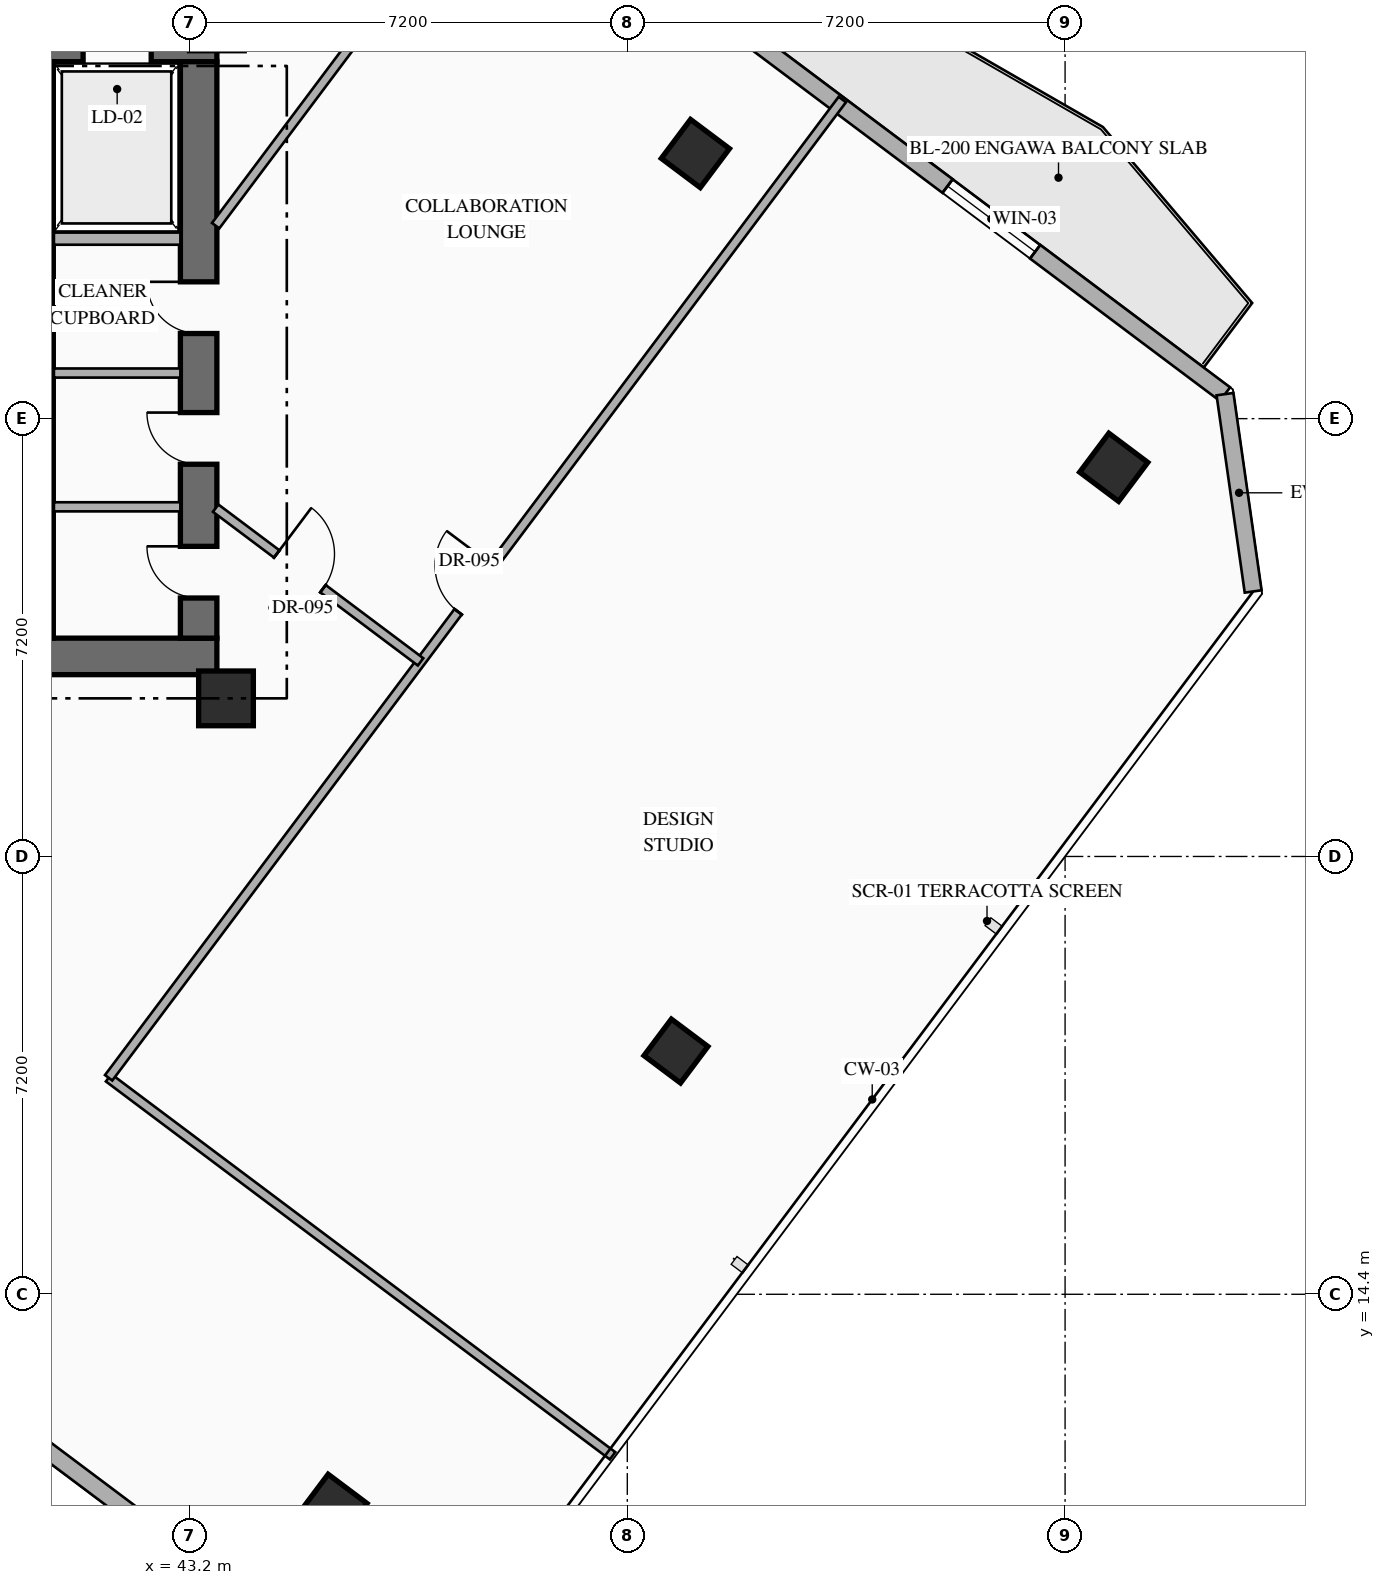
"""IFC4 building model, lengths in metres.
Left out: names, types, materials, properties, quantities, classifications, styles, units other than length and angle.
Written with IfcOpenShell. Run it as: python <this file> out.ifc"""

import sys

from ifc_helpers import new_model, si_unit, direction, frame, frame_2d, origin, origin_2d, place, context, subcontext, project, spatial, rectangle, hollow_rectangle, extrude, element, fill, save


model = new_model("IFC4")
c1 = context("Model", 3, precision=1e-05, world=origin(), true_north=direction((0.0, 1.0)))
c2 = subcontext(c1, "Body", "Model", "MODEL_VIEW")
j1 = project(units=[si_unit("LENGTHUNIT", "METRE"), si_unit("PLANEANGLEUNIT", "RADIAN")], contexts=[c1])
p1 = place(None, origin())
s1 = spatial("IfcSite", under=j1, at=p1, CompositionType="ELEMENT")
p2 = place(p1, origin())
s2 = spatial("IfcBuilding", under=s1, at=p2, CompositionType="ELEMENT")
p3 = place(p2, frame((0.0, 0.0, 170.85)))
s3 = spatial("IfcBuildingStorey", under=s2, at=p3, CompositionType="ELEMENT", Elevation=170.85)
p4 = place(p3, frame((35.89, 24.89, 0.0), z_axis=(0.0, 0.0, 1.0), x_axis=(1.0, 0.0, 0.0)))
e1 = element("IfcWall", 1, at=p4, inside=s3, PredefinedType="SHEAR", context=c2, shape_type="SweptSolid", body=[
    extrude(rectangle(XDim=7.76, YDim=0.6, at=frame_2d((3.88, 0.0))), origin(), (0.0, 0.0, 1.0), 3.6),
])
p5 = place(p3, frame((35.89, 34.97, 0.0), z_axis=(0.0, 0.0, 1.0), x_axis=(1.0, 0.0, 0.0)))
e2 = element("IfcWall", 2, at=p5, inside=s3, PredefinedType="SHEAR", context=c2, shape_type="SweptSolid", body=[
    extrude(rectangle(XDim=7.76, YDim=0.6, at=frame_2d((3.88, 0.0))), origin(), (0.0, 0.0, 1.0), 3.6),
])
p6 = place(p5, frame((2.66, 0.0, 0.0)))
e3 = element("IfcOpeningElement", 3, at=p6, cuts=e2, PredefinedType="OPENING", context=c2, shape_type="SweptSolid", body=[
    extrude(rectangle(XDim=1.1, YDim=2.2, at=frame_2d((0.55, 1.1))), frame((0.0, 0.31, 0.0), z_axis=(0.0, -1.0, 0.0), x_axis=(1.0, 0.0, 0.0)), (0.0, 0.0, 1.0), 0.62),
])
p7 = place(p5, frame((5.56, 0.0, 0.0)))
e4 = element("IfcOpeningElement", 4, at=p7, cuts=e2, PredefinedType="OPENING", context=c2, shape_type="SweptSolid", body=[
    extrude(rectangle(XDim=1.12, YDim=2.15, at=frame_2d((0.56, 1.075))), frame((0.0, 0.31, 0.0), z_axis=(0.0, -1.0, 0.0), x_axis=(1.0, 0.0, 0.0)), (0.0, 0.0, 1.0), 0.62),
])
p8 = place(p3, frame((43.35, 25.19, 0.0), z_axis=(0.0, 0.0, 1.0), x_axis=(0.0, 1.0, 0.0)))
e5 = element("IfcWall", 5, at=p8, inside=s3, PredefinedType="SHEAR", context=c2, shape_type="SweptSolid", body=[
    extrude(rectangle(XDim=9.48, YDim=0.6, at=frame_2d((4.74, 0.0))), origin(), (0.0, 0.0, 1.0), 3.6),
])
p9 = place(p8, frame((0.66, 0.0, 0.0)))
e6 = element("IfcOpeningElement", 6, at=p9, cuts=e5, PredefinedType="OPENING", context=c2, shape_type="SweptSolid", body=[
    extrude(rectangle(XDim=0.85, YDim=2.08, at=frame_2d((0.425, 1.04))), frame((0.0, 0.31, 0.0), z_axis=(0.0, -1.0, 0.0), x_axis=(1.0, 0.0, 0.0)), (0.0, 0.0, 1.0), 0.62),
])
p10 = place(p8, frame((2.86, 0.0, 0.0)))
e7 = element("IfcOpeningElement", 7, at=p10, cuts=e5, PredefinedType="OPENING", context=c2, shape_type="SweptSolid", body=[
    extrude(rectangle(XDim=0.85, YDim=2.08, at=frame_2d((0.425, 1.04))), frame((0.0, 0.31, 0.0), z_axis=(0.0, -1.0, 0.0), x_axis=(1.0, 0.0, 0.0)), (0.0, 0.0, 1.0), 0.62),
])
p11 = place(p8, frame((5.01, 0.0, 0.0)))
e8 = element("IfcOpeningElement", 8, at=p11, cuts=e5, PredefinedType="OPENING", context=c2, shape_type="SweptSolid", body=[
    extrude(rectangle(XDim=0.85, YDim=2.08, at=frame_2d((0.425, 1.04))), frame((0.0, 0.31, 0.0), z_axis=(0.0, -1.0, 0.0), x_axis=(1.0, 0.0, 0.0)), (0.0, 0.0, 1.0), 0.62),
])
p12 = place(p3, frame((40.81, 25.19, 0.0), z_axis=(0.0, 0.0, 1.0), x_axis=(0.0, 1.0, 0.0)))
e9 = element("IfcWall", 9, at=p12, inside=s3, PredefinedType="SHEAR", context=c2, shape_type="SweptSolid", body=[
    extrude(rectangle(XDim=9.48, YDim=0.3, at=frame_2d((4.74, 0.0))), origin(), (0.0, 0.0, 1.0), 3.6),
])
p13 = place(p3, frame((43.8, 24.2, 0.0), z_axis=(0.0, 0.0, 1.0), x_axis=(1.0, 0.0, 0.0)))
e10 = element("IfcColumn", 10, at=p13, inside=s3, PredefinedType="COLUMN", context=c2, shape_type="SweptSolid", body=[
    extrude(rectangle(XDim=0.9, YDim=0.9, at=origin_2d()), origin(), (0.0, 0.0, 1.0), 3.6),
])
for number, where, z_axis, x_axis in (
    (11, (51.52, 33.16, 0.0), (0.0, 0.0, 1.0), (0.8, -0.6, 0.0)),
    (12, (45.56, 10.88, 0.0), (0.0, 0.0, 1.0), (0.8, -0.6, 0.0)),
    (13, (58.4, 28.0, 0.0), (0.0, 0.0, 1.0), (0.8, -0.6, 0.0)),
):
    element("IfcColumn", number, at=place(p3, frame(where, z_axis=z_axis, x_axis=x_axis)), inside=s3, PredefinedType="COLUMN", context=c2, shape_type="SweptSolid", body=[
        extrude(hollow_rectangle(XDim=0.8, YDim=0.8, WallThickness=0.032, at=origin_2d()), origin(), (0.0, 0.0, 1.0), 3.6),
    ])
p14 = place(p3, frame((51.2, 18.4, 0.0), z_axis=(0.0, 0.0, 1.0), x_axis=(0.799999996291, -0.600000004945, 0.0)))
e14 = element("IfcColumn", 14, at=p14, inside=s3, PredefinedType="COLUMN", context=c2, shape_type="SweptSolid", body=[
    extrude(hollow_rectangle(XDim=0.75, YDim=0.75, WallThickness=0.028, at=origin_2d()), origin(), (0.0, 0.0, 1.0), 3.6),
])
p15 = place(p3, frame((44.86, 40.73, 0.0), z_axis=(0.0, 0.0, 1.0), x_axis=(0.800007624502, -0.599989833863, 0.0)))
e15 = element("IfcWall", 15, at=p15, inside=s3, PredefinedType="STANDARD", context=c2, shape_type="SweptSolid", body=[
    extrude(rectangle(XDim=19.212, YDim=0.28, at=frame_2d((9.606, 0.0))), origin(), (0.0, 0.0, 1.0), 3.35),
])
p16 = place(p15, frame((1.755, 0.0, 0.0)))
e16 = element("IfcOpeningElement", 16, at=p16, cuts=e15, PredefinedType="OPENING", context=c2, shape_type="SweptSolid", body=[
    extrude(rectangle(XDim=1.1, YDim=2.2, at=frame_2d((0.55, 1.1))), frame((0.0, 0.15, 0.0), z_axis=(0.0, -1.0, 0.0), x_axis=(1.0, 0.0, 0.0)), (0.0, 0.0, 1.0), 0.3),
])
p17 = place(p15, frame((13.509, 0.0, 0.85)))
e17 = element("IfcOpeningElement", 17, at=p17, cuts=e15, PredefinedType="OPENING", context=c2, shape_type="SweptSolid", body=[
    extrude(rectangle(XDim=1.8, YDim=2.1, at=frame_2d((0.9, 1.05))), frame((0.0, 0.15, 0.0), z_axis=(0.0, -1.0, 0.0), x_axis=(1.0, 0.0, 0.0)), (0.0, 0.0, 1.0), 0.3),
])
p18 = place(p3, frame((60.23, 29.203, 0.0), z_axis=(0.0, 0.0, 1.0), x_axis=(0.141296221922, -0.989967361922, 0.0)))
e18 = element("IfcWall", 18, at=p18, inside=s3, PredefinedType="STANDARD", context=c2, shape_type="SweptSolid", body=[
    extrude(rectangle(XDim=3.278, YDim=0.28, at=frame_2d((1.639, 0.0))), origin(), (0.0, 0.0, 1.0), 3.35),
])
p19 = place(p3, frame((44.918, 8.787, 0.0), z_axis=(0.0, 0.0, 1.0), x_axis=(-0.800004765927, 0.599993645378, 0.0)))
e19 = element("IfcWall", 19, at=p19, inside=s3, PredefinedType="STANDARD", context=c2, shape_type="SweptSolid", body=[
    extrude(rectangle(XDim=24.588, YDim=0.28, at=frame_2d((12.294, 0.0))), origin(), (0.0, 0.0, 1.0), 3.35),
])
p20 = place(p3, frame((40.97, 31.76, 0.0), z_axis=(0.0, 0.0, 1.0), x_axis=(1.0, 0.0, 0.0)))
e20 = element("IfcWall", 20, at=p20, inside=s3, PredefinedType="STANDARD", context=c2, shape_type="SweptSolid", body=[
    extrude(rectangle(XDim=2.08, YDim=0.2, at=frame_2d((1.04, 0.0))), origin(), (0.0, 0.0, 1.0), 3.35),
])
for number, where, z_axis, x_axis in (
    (21, (40.97, 27.35, 0.0), (0.0, 0.0, 1.0), (1.0, 0.0, 0.0)),
    (22, (40.97, 29.55, 0.0), (0.0, 0.0, 1.0), (1.0, 0.0, 0.0)),
):
    element("IfcWall", number, at=place(p3, frame(where, z_axis=z_axis, x_axis=x_axis)), inside=s3, PredefinedType="PARTITIONING", context=c2, shape_type="SweptSolid", body=[
        extrude(rectangle(XDim=2.08, YDim=0.15, at=frame_2d((1.04, 0.0))), origin(), (0.0, 0.0, 1.0), 3.35),
    ])
p21 = place(p3, frame((41.87, 17.96, 0.0), z_axis=(0.0, 0.0, 1.0), x_axis=(0.799991516197, -0.600011311571, 0.0)))
e23 = element("IfcWall", 23, at=p21, inside=s3, PredefinedType="PARTITIONING", context=c2, shape_type="SweptSolid", body=[
    extrude(rectangle(XDim=10.36, YDim=0.15, at=frame_2d((5.18, 0.0))), origin(), (0.0, 0.0, 1.0), 3.35),
])
p22 = place(p3, frame((41.87, 17.96, 0.0), z_axis=(0.0, 0.0, 1.0), x_axis=(0.599994172676, 0.80000437046, 0.0)))
e24 = element("IfcWall", 24, at=p22, inside=s3, PredefinedType="PARTITIONING", context=c2, shape_type="SweptSolid", body=[
    extrude(rectangle(XDim=20.11, YDim=0.15, at=frame_2d((10.055, 0.0))), origin(), (0.0, 0.0, 1.0), 3.35),
])
p23 = place(p22, frame((9.58, 0.0, 0.0)))
e25 = element("IfcOpeningElement", 25, at=p23, cuts=e24, PredefinedType="OPENING", context=c2, shape_type="SweptSolid", body=[
    extrude(rectangle(XDim=0.95, YDim=2.15, at=frame_2d((0.475, 1.075))), frame((0.0, 0.085, 0.0), z_axis=(0.0, -1.0, 0.0), x_axis=(1.0, 0.0, 0.0)), (0.0, 0.0, 1.0), 0.17),
])
p24 = place(p3, frame((43.63, 27.328, 0.0), z_axis=(0.0, 0.0, 1.0), x_axis=(0.799972182084, -0.600037088764, 0.0)))
e26 = element("IfcWall", 26, at=p24, inside=s3, PredefinedType="PARTITIONING", context=c2, shape_type="SweptSolid", body=[
    extrude(rectangle(XDim=4.213, YDim=0.15, at=frame_2d((2.106, 0.0))), origin(), (0.0, 0.0, 1.0), 3.045),
])
p25 = place(p24, frame((1.256, 0.0, 0.0)))
e27 = element("IfcOpeningElement", 27, at=p25, cuts=e26, PredefinedType="OPENING", context=c2, shape_type="SweptSolid", body=[
    extrude(rectangle(XDim=0.95, YDim=2.15, at=frame_2d((0.475, 1.075))), frame((0.0, 0.085, 0.0), z_axis=(0.0, -1.0, 0.0), x_axis=(1.0, 0.0, 0.0)), (0.0, 0.0, 1.0), 0.17),
])
p26 = place(p3, frame((43.63, 31.973, 0.0), z_axis=(0.0, 0.0, 1.0), x_axis=(0.599975099311, 0.800018674911, 0.0)))
e28 = element("IfcWall", 28, at=p26, inside=s3, PredefinedType="PARTITIONING", context=c2, shape_type="SweptSolid", body=[
    extrude(rectangle(XDim=7.844, YDim=0.15, at=frame_2d((3.922, 0.0))), origin(), (0.0, 0.0, 1.0), 3.35),
])
p27 = place(p17, origin())
e29 = element("IfcWindow", 29, at=p27, inside=s3, PartitioningType="SINGLE_PANEL", PredefinedType="WINDOW", context=c2, shape_type="SweptSolid", body=[
    extrude(rectangle(XDim=1.8, YDim=2.1, at=frame_2d((0.9, 1.05))), frame((0.0, 0.03, 0.0), z_axis=(0.0, -1.0, 0.0), x_axis=(1.0, 0.0, 0.0)), (0.0, 0.0, 1.0), 0.06),
])
fill(e17, e29)
p28 = place(p9, origin())
e30 = element("IfcDoor", 30, at=p28, inside=s3, OperationType="SINGLE_SWING_RIGHT", PredefinedType="DOOR", context=c2, shape_type="SweptSolid", body=[
    extrude(rectangle(XDim=0.85, YDim=2.08, at=frame_2d((0.425, 1.04))), frame((0.0, 0.025, 0.0), z_axis=(0.0, -1.0, 0.0), x_axis=(1.0, 0.0, 0.0)), (0.0, 0.0, 1.0), 0.05),
])
fill(e6, e30)
p29 = place(p10, origin())
e31 = element("IfcDoor", 31, at=p29, inside=s3, OperationType="SINGLE_SWING_RIGHT", PredefinedType="DOOR", context=c2, shape_type="SweptSolid", body=[
    extrude(rectangle(XDim=0.85, YDim=2.08, at=frame_2d((0.425, 1.04))), frame((0.0, 0.025, 0.0), z_axis=(0.0, -1.0, 0.0), x_axis=(1.0, 0.0, 0.0)), (0.0, 0.0, 1.0), 0.05),
])
fill(e7, e31)
p30 = place(p11, origin())
e32 = element("IfcDoor", 32, at=p30, inside=s3, OperationType="SINGLE_SWING_RIGHT", PredefinedType="DOOR", context=c2, shape_type="SweptSolid", body=[
    extrude(rectangle(XDim=0.85, YDim=2.08, at=frame_2d((0.425, 1.04))), frame((0.0, 0.025, 0.0), z_axis=(0.0, -1.0, 0.0), x_axis=(1.0, 0.0, 0.0)), (0.0, 0.0, 1.0), 0.05),
])
fill(e8, e32)
p31 = place(p23, origin())
e33 = element("IfcDoor", 33, at=p31, inside=s3, OperationType="SINGLE_SWING_RIGHT", PredefinedType="DOOR", context=c2, shape_type="SweptSolid", body=[
    extrude(rectangle(XDim=0.95, YDim=2.15, at=frame_2d((0.475, 1.075))), frame((0.0, 0.025, 0.0), z_axis=(0.0, -1.0, 0.0), x_axis=(1.0, 0.0, 0.0)), (0.0, 0.0, 1.0), 0.05),
])
fill(e25, e33)
p32 = place(p25, origin())
e34 = element("IfcDoor", 34, at=p32, inside=s3, OperationType="SINGLE_SWING_LEFT", PredefinedType="DOOR", context=c2, shape_type="SweptSolid", body=[
    extrude(rectangle(XDim=0.95, YDim=2.15, at=frame_2d((0.475, 1.075))), frame((0.0, 0.025, 0.0), z_axis=(0.0, -1.0, 0.0), x_axis=(1.0, 0.0, 0.0)), (0.0, 0.0, 1.0), 0.05),
])
fill(e27, e34)
save(model, sys.argv[1])
